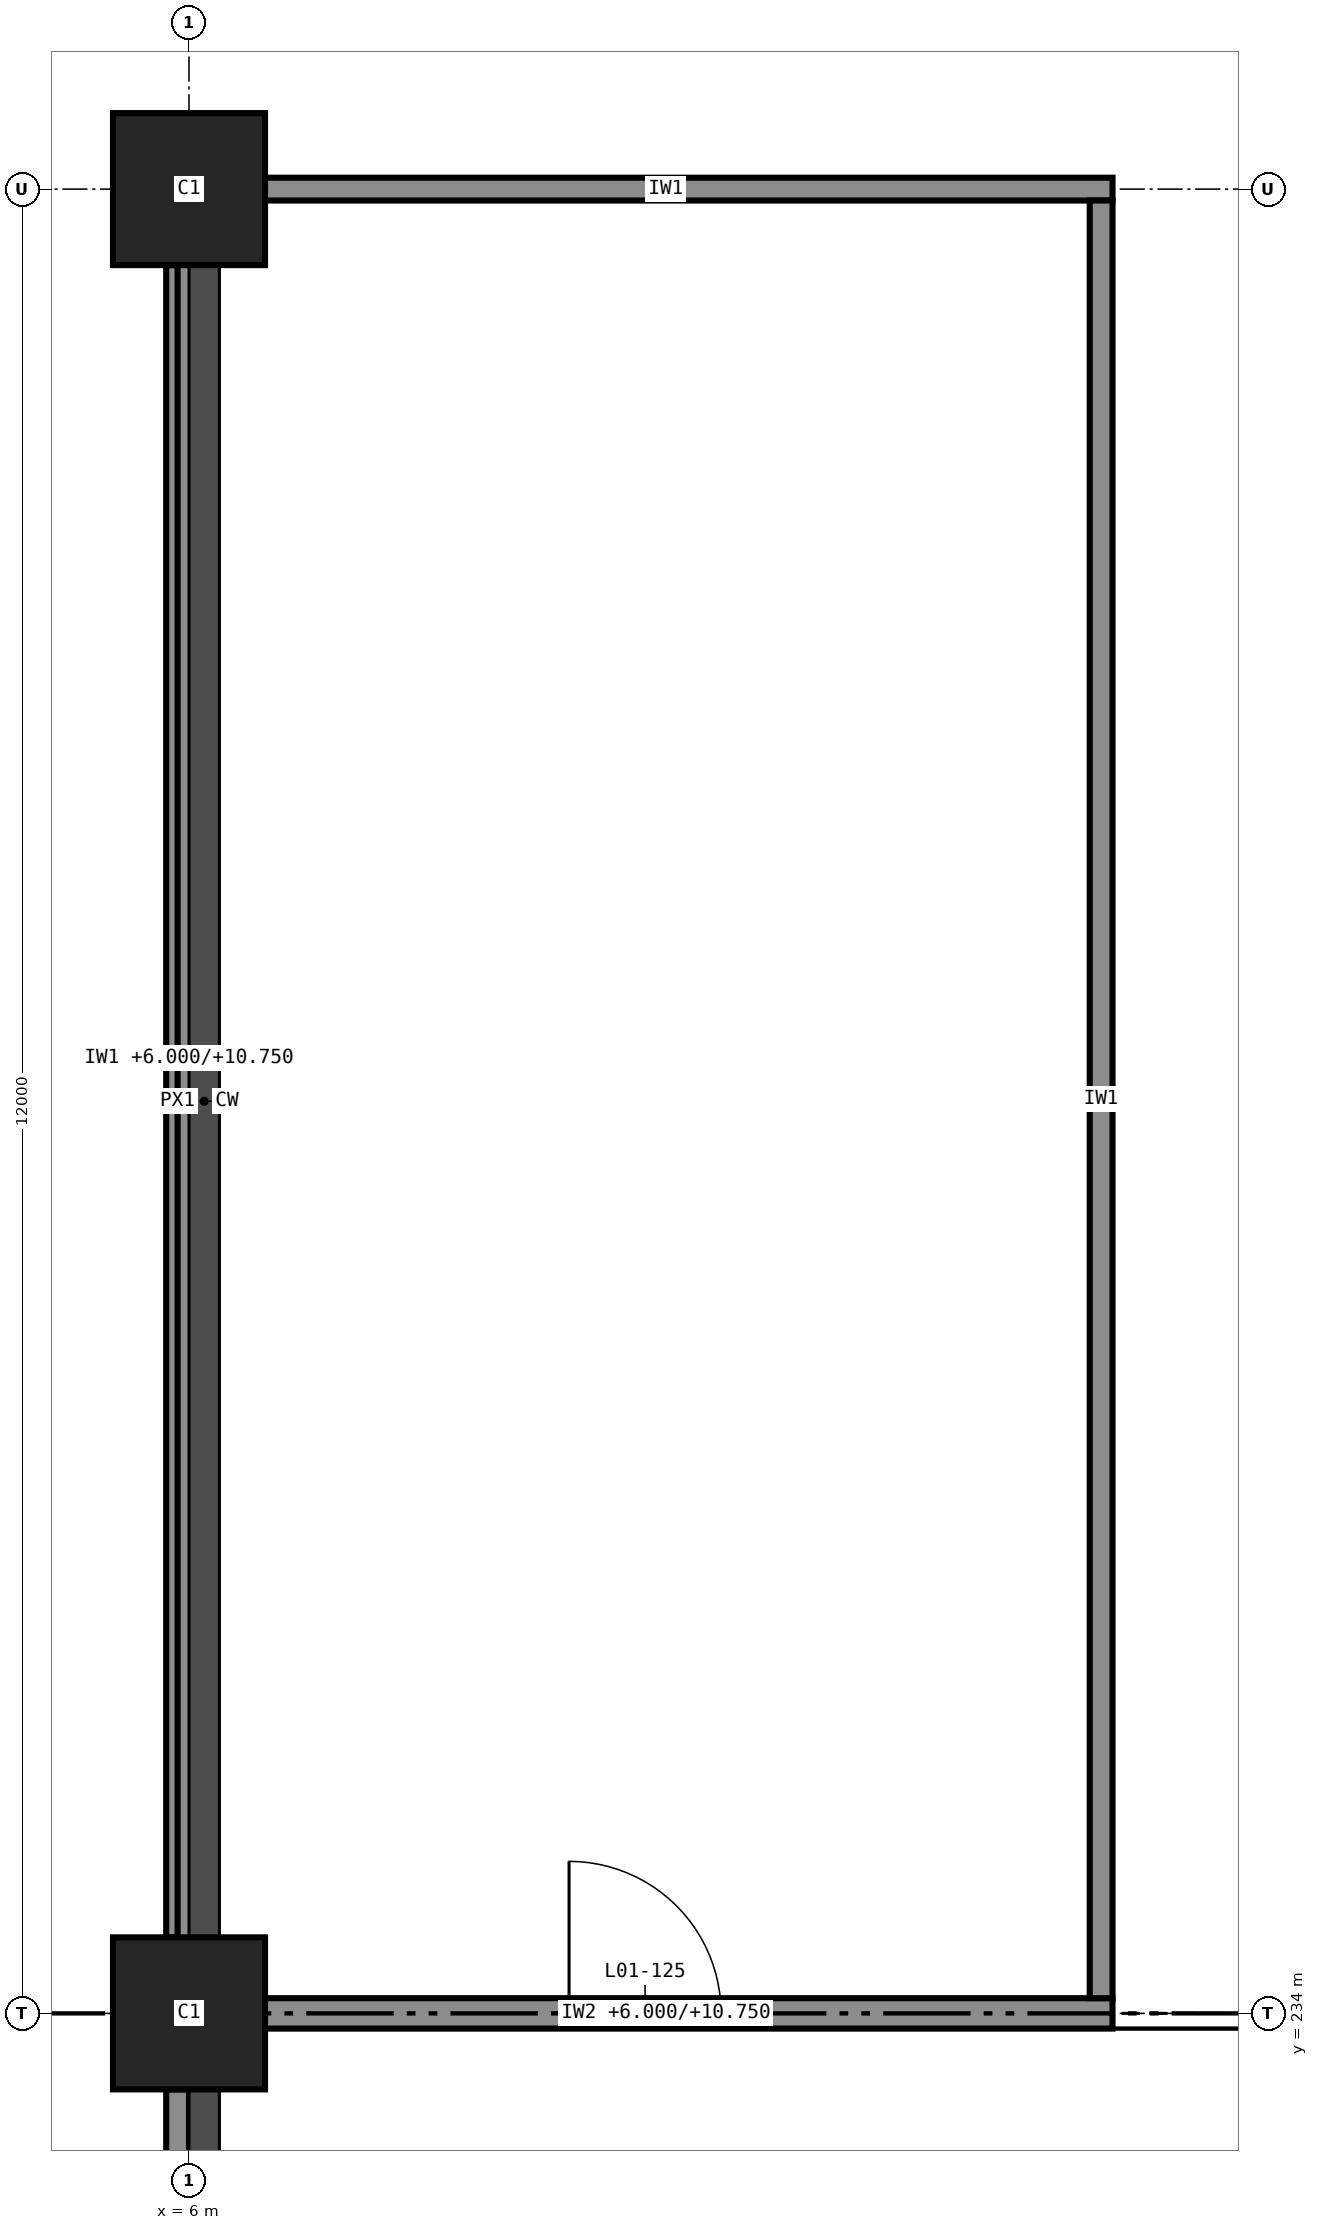
"""IFC4 building model, lengths in metres.
Left out: names, types, materials, properties, quantities, classifications, styles, units other than length and angle.
Written with IfcOpenShell. Run it as: python <this file> out.ifc"""

import sys

from ifc_helpers import new_model, si_unit, direction, frame, frame_2d, origin, origin_2d, place, context, subcontext, project, spatial, rectangle, extrude, element, fill, save


model = new_model("IFC4")
c1 = context("Model", 3, precision=1e-05, world=origin(), true_north=direction((0.0, 1.0)))
c2 = subcontext(c1, "Body", "Model", "MODEL_VIEW")
j1 = project(units=[si_unit("LENGTHUNIT", "METRE"), si_unit("PLANEANGLEUNIT", "RADIAN")], contexts=[c1])
p1 = place(None, origin())
s1 = spatial("IfcSite", under=j1, at=p1, CompositionType="ELEMENT")
p2 = place(p1, origin())
s2 = spatial("IfcBuilding", under=s1, at=p2, CompositionType="ELEMENT")
p3 = place(p2, frame((0.0, 0.0, 6.0)))
s3 = spatial("IfcBuildingStorey", under=s2, at=p3, CompositionType="ELEMENT", Elevation=6.0)
for number, where, z_axis, x_axis in (
    (1, (6.0, 234.0, 0.0), (0.0, 0.0, 1.0), (1.0, 0.0, 0.0)),
    (2, (6.0, 246.0, 0.0), (0.0, 0.0, 1.0), (1.0, 0.0, 0.0)),
):
    element("IfcColumn", number, at=place(p3, frame(where, z_axis=z_axis, x_axis=x_axis)), inside=s3, PredefinedType="COLUMN", context=c2, shape_type="SweptSolid", body=[
        extrude(rectangle(XDim=1.0, YDim=1.0, at=origin_2d()), origin(), (0.0, 0.0, 1.0), 6.0),
    ])
p4 = place(p3, frame((5.925, 245.5, 5.75), z_axis=(0.0, 0.0, 1.0), x_axis=(0.0, -1.0, 0.0)))
e3 = element("IfcWall", 3, at=p4, inside=s3, PredefinedType="STANDARD", context=c2, shape_type="SweptSolid", body=[
    extrude(rectangle(XDim=11.0, YDim=0.15, at=frame_2d((5.5, 0.0))), origin(), (0.0, 0.0, 1.0), 0.25),
])
p5 = place(p3, frame((5.925, 233.5, 5.75), z_axis=(0.0, 0.0, 1.0), x_axis=(0.0, -1.0, 0.0)))
e4 = element("IfcWall", 4, at=p5, inside=s3, PredefinedType="STANDARD", context=c2, shape_type="SweptSolid", body=[
    extrude(rectangle(XDim=11.5, YDim=0.15, at=frame_2d((5.75, 0.0))), origin(), (0.0, 0.0, 1.0), 0.25),
])
p6 = place(p3, frame((6.2, 234.0, 0.0), z_axis=(0.0, 0.0, 1.0), x_axis=(1.0, 0.0, 0.0)))
e5 = element("IfcWall", 5, at=p6, inside=s3, PredefinedType="PARTITIONING", context=c2, shape_type="SweptSolid", body=[
    extrude(rectangle(XDim=5.875, YDim=0.2, at=frame_2d((2.938, 0.0))), origin(), (0.0, 0.0, 1.0), 4.75),
])
p7 = place(p6, frame((2.3, 0.0, 0.0)))
e6 = element("IfcOpeningElement", 6, at=p7, cuts=e5, PredefinedType="OPENING", context=c2, shape_type="SweptSolid", body=[
    extrude(rectangle(XDim=1.0, YDim=2.1, at=frame_2d((0.5, 1.05))), frame((0.0, 0.11, 0.0), z_axis=(0.0, -1.0, 0.0), x_axis=(1.0, 0.0, 0.0)), (0.0, 0.0, 1.0), 0.22),
])
p8 = place(p3, frame((6.2, 246.0, 0.0), z_axis=(0.0, 0.0, 1.0), x_axis=(1.0, 0.0, 0.0)))
e7 = element("IfcWall", 7, at=p8, inside=s3, PredefinedType="PARTITIONING", context=c2, shape_type="SweptSolid", body=[
    extrude(rectangle(XDim=5.875, YDim=0.15, at=frame_2d((2.938, 0.0))), origin(), (0.0, 0.0, 1.0), 5.75),
])
p9 = place(p3, frame((6.0, 234.1, 0.0), z_axis=(0.0, 0.0, 1.0), x_axis=(0.0, 1.0, 0.0)))
e8 = element("IfcWall", 8, at=p9, inside=s3, PredefinedType="PARTITIONING", context=c2, shape_type="SweptSolid", body=[
    extrude(rectangle(XDim=11.825, YDim=0.15, at=frame_2d((5.913, 0.0))), origin(), (0.0, 0.0, 1.0), 4.75),
])
p10 = place(p3, frame((12.0, 234.1, 0.0), z_axis=(0.0, 0.0, 1.0), x_axis=(0.0, 1.0, 0.0)))
e9 = element("IfcWall", 9, at=p10, inside=s3, PredefinedType="PARTITIONING", context=c2, shape_type="SweptSolid", body=[
    extrude(rectangle(XDim=11.825, YDim=0.15, at=frame_2d((5.913, 0.0))), origin(), (0.0, 0.0, 1.0), 5.75),
])
p11 = place(p7, origin())
e10 = element("IfcDoor", 10, at=p11, inside=s3, OperationType="SINGLE_SWING_RIGHT", PredefinedType="DOOR", context=c2, shape_type="SweptSolid", body=[
    extrude(rectangle(XDim=1.0, YDim=2.1, at=frame_2d((0.5, 1.05))), frame((0.0, 0.025, 0.0), z_axis=(0.0, -1.0, 0.0), x_axis=(1.0, 0.0, 0.0)), (0.0, 0.0, 1.0), 0.05),
])
fill(e6, e10)
save(model, sys.argv[1])
